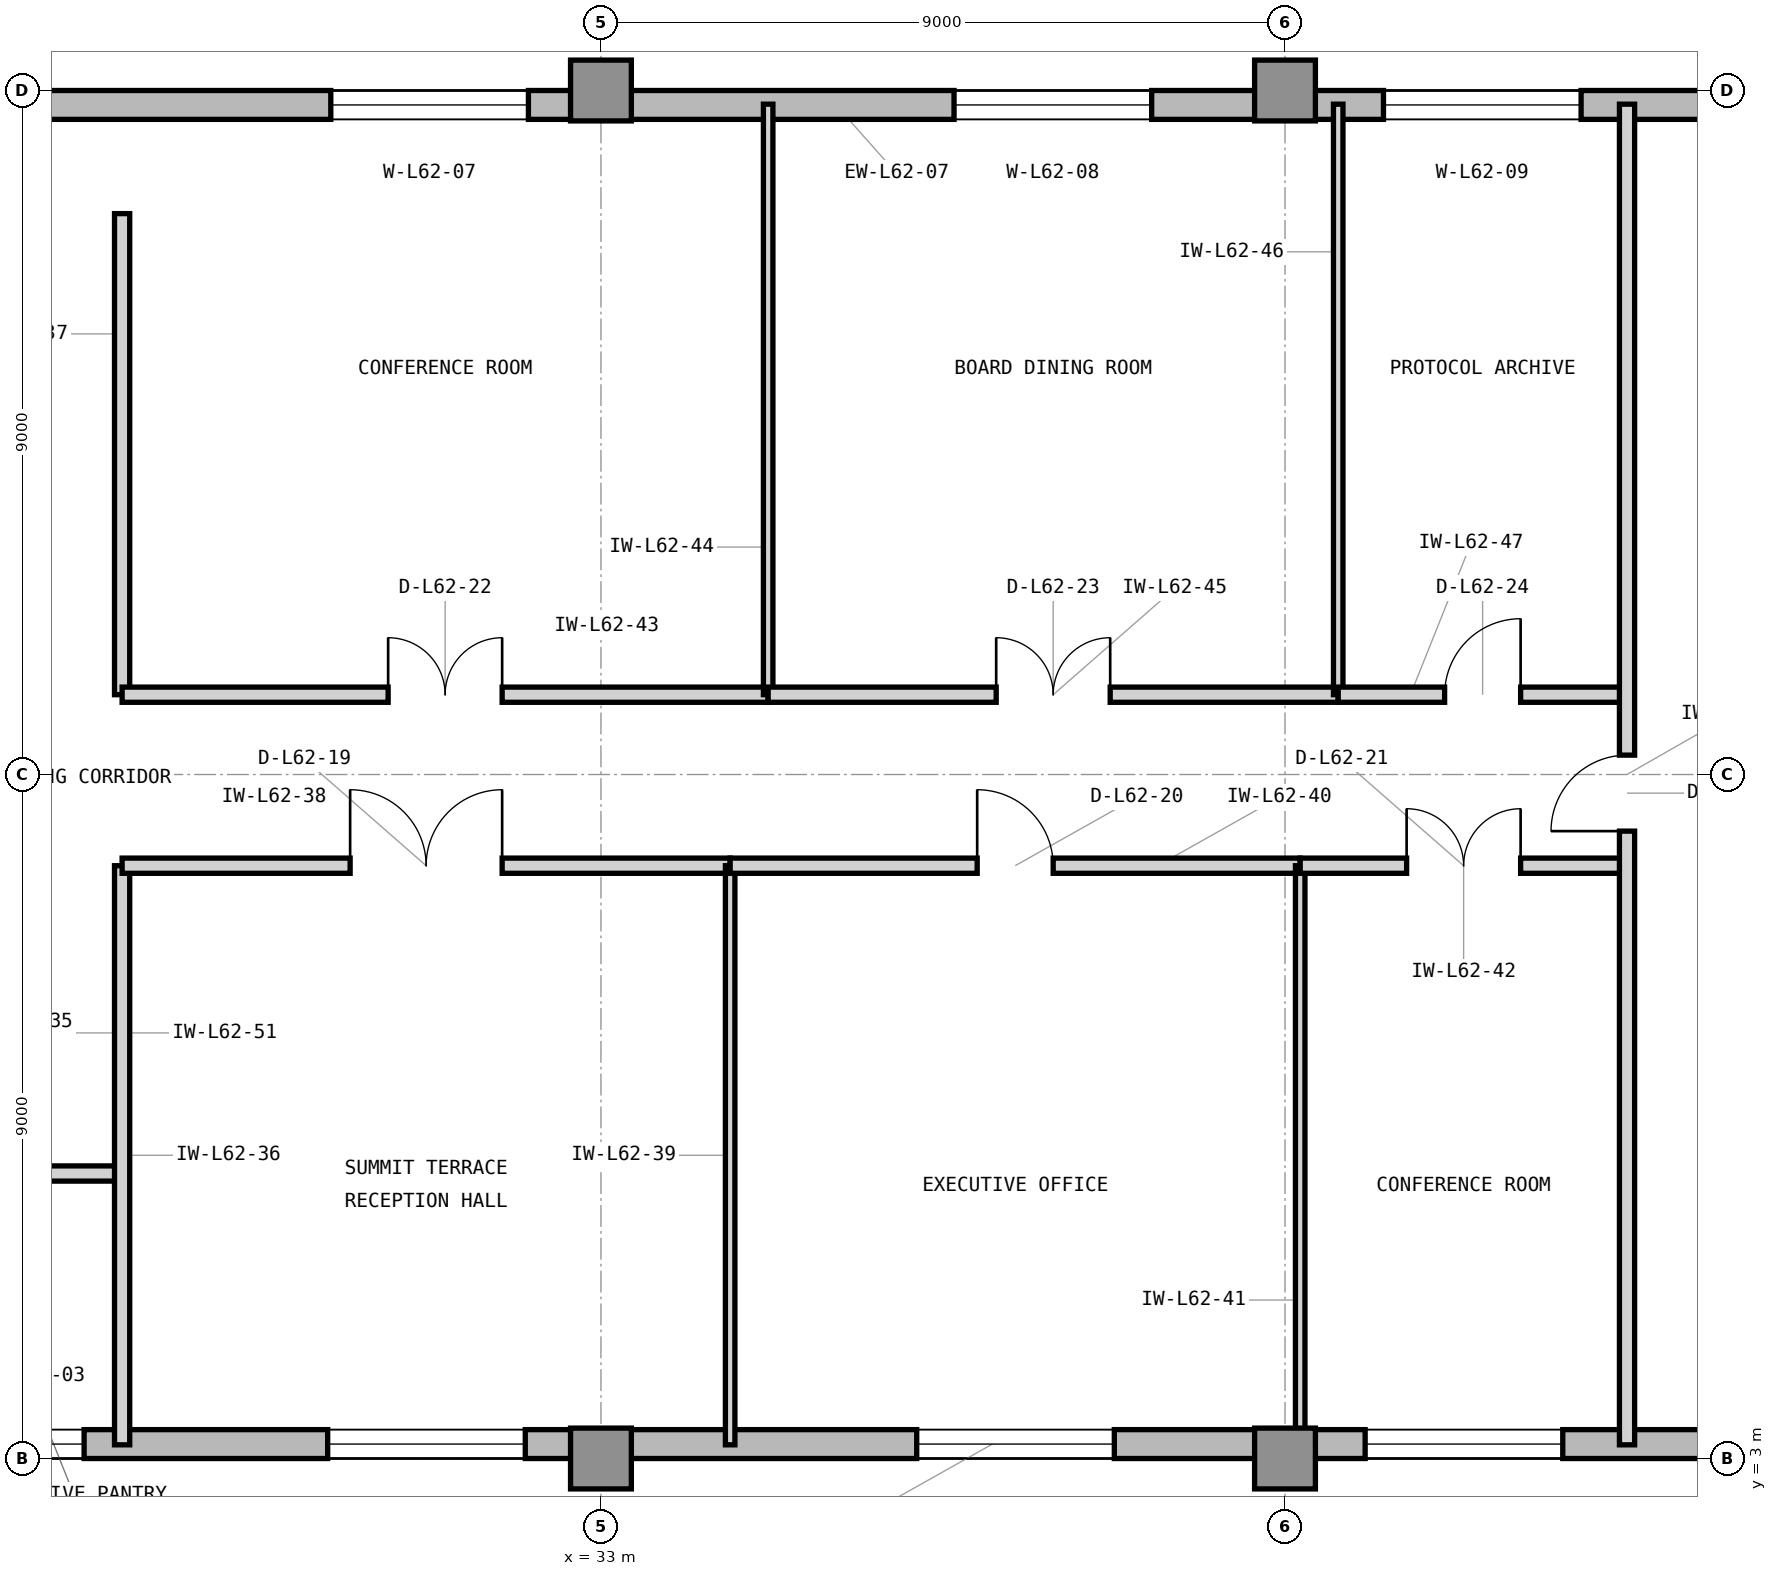
"""IFC4 building model, lengths in metres.
Left out: names, types, materials, properties, quantities, classifications, styles, units other than length and angle.
Written with IfcOpenShell. Run it as: python <this file> out.ifc"""

import sys

from ifc_helpers import new_model, si_unit, direction, frame, frame_2d, origin, origin_2d, place, context, subcontext, project, spatial, rectangle, extrude, element, fill, save


model = new_model("IFC4")
c1 = context("Model", 3, precision=1e-05, world=origin(), true_north=direction((0.0, 1.0)))
c2 = subcontext(c1, "Body", "Model", "MODEL_VIEW")
j1 = project(units=[si_unit("LENGTHUNIT", "METRE"), si_unit("PLANEANGLEUNIT", "RADIAN")], contexts=[c1])
p1 = place(None, origin())
s1 = spatial("IfcSite", under=j1, at=p1, CompositionType="ELEMENT")
p2 = place(p1, origin())
s2 = spatial("IfcBuilding", under=s1, at=p2, CompositionType="ELEMENT")
p3 = place(p2, frame((0.0, 0.0, 254.7)))
s3 = spatial("IfcBuildingStorey", under=s2, at=p3, CompositionType="ELEMENT", Elevation=254.7)
for number, where, z_axis, x_axis in (
    (1, (33.0, 3.0, 0.0), (0.0, 0.0, 1.0), (1.0, 0.0, 0.0)),
    (2, (33.0, 21.0, 0.0), (0.0, 0.0, 1.0), (1.0, 0.0, 0.0)),
    (3, (42.0, 3.0, 0.0), (0.0, 0.0, 1.0), (1.0, 0.0, 0.0)),
    (4, (42.0, 21.0, 0.0), (0.0, 0.0, 1.0), (1.0, 0.0, 0.0)),
):
    element("IfcColumn", number, at=place(p3, frame(where, z_axis=z_axis, x_axis=x_axis)), inside=s3, PredefinedType="COLUMN", context=c2, shape_type="SweptSolid", body=[
        extrude(rectangle(XDim=0.8, YDim=0.8, at=origin_2d()), origin(), (0.0, 0.0, 1.0), 3.9),
    ])
p4 = place(p3, frame((23.9, 3.19, 0.0), z_axis=(0.0, 0.0, 1.0), x_axis=(1.0, 0.0, 0.0)))
e5 = element("IfcWall", 5, at=p4, inside=s3, PredefinedType="STANDARD", context=c2, shape_type="SweptSolid", body=[
    extrude(rectangle(XDim=28.5, YDim=0.38, at=frame_2d((14.25, 0.0))), origin(), (0.0, 0.0, 1.0), 3.715),
])
p5 = place(p4, frame((1.1, 0.0, 0.8)))
e6 = element("IfcOpeningElement", 6, at=p5, cuts=e5, PredefinedType="OPENING", context=c2, shape_type="SweptSolid", body=[
    extrude(rectangle(XDim=1.2, YDim=2.35, at=frame_2d((0.6, 1.175))), frame((0.0, 0.2, 0.0), z_axis=(0.0, -1.0, 0.0), x_axis=(1.0, 0.0, 0.0)), (0.0, 0.0, 1.0), 0.4),
])
p6 = place(p4, frame((5.504, 0.0, 0.8)))
e7 = element("IfcOpeningElement", 7, at=p6, cuts=e5, PredefinedType="OPENING", context=c2, shape_type="SweptSolid", body=[
    extrude(rectangle(XDim=2.6, YDim=2.35, at=frame_2d((1.3, 1.175))), frame((0.0, 0.2, 0.0), z_axis=(0.0, -1.0, 0.0), x_axis=(1.0, 0.0, 0.0)), (0.0, 0.0, 1.0), 0.4),
])
p7 = place(p4, frame((13.254, 0.0, 0.8)))
e8 = element("IfcOpeningElement", 8, at=p7, cuts=e5, PredefinedType="OPENING", context=c2, shape_type="SweptSolid", body=[
    extrude(rectangle(XDim=2.6, YDim=2.35, at=frame_2d((1.3, 1.175))), frame((0.0, 0.2, 0.0), z_axis=(0.0, -1.0, 0.0), x_axis=(1.0, 0.0, 0.0)), (0.0, 0.0, 1.0), 0.4),
])
p8 = place(p4, frame((19.154, 0.0, 0.8)))
e9 = element("IfcOpeningElement", 9, at=p8, cuts=e5, PredefinedType="OPENING", context=c2, shape_type="SweptSolid", body=[
    extrude(rectangle(XDim=2.6, YDim=2.35, at=frame_2d((1.3, 1.175))), frame((0.0, 0.2, 0.0), z_axis=(0.0, -1.0, 0.0), x_axis=(1.0, 0.0, 0.0)), (0.0, 0.0, 1.0), 0.4),
])
p9 = place(p3, frame((52.4, 20.81, 0.0), z_axis=(0.0, 0.0, 1.0), x_axis=(-1.0, 0.0, 0.0)))
e10 = element("IfcWall", 10, at=p9, inside=s3, PredefinedType="STANDARD", context=c2, shape_type="SweptSolid", body=[
    extrude(rectangle(XDim=32.62, YDim=0.38, at=frame_2d((16.31, 0.0))), origin(), (0.0, 0.0, 1.0), 3.715),
])
p10 = place(p9, frame((29.6, 0.0, 0.0)))
e11 = element("IfcOpeningElement", 11, at=p10, cuts=e10, PredefinedType="OPENING", context=c2, shape_type="SweptSolid", body=[
    extrude(rectangle(XDim=1.1, YDim=2.3, at=frame_2d((0.55, 1.15))), frame((0.0, 0.2, 0.0), z_axis=(0.0, -1.0, 0.0), x_axis=(1.0, 0.0, 0.0)), (0.0, 0.0, 1.0), 0.4),
])
p11 = place(p9, frame((20.354, 0.0, 0.8)))
e12 = element("IfcOpeningElement", 12, at=p11, cuts=e10, PredefinedType="OPENING", context=c2, shape_type="SweptSolid", body=[
    extrude(rectangle(XDim=2.6, YDim=2.35, at=frame_2d((1.3, 1.175))), frame((0.0, 0.2, 0.0), z_axis=(0.0, -1.0, 0.0), x_axis=(1.0, 0.0, 0.0)), (0.0, 0.0, 1.0), 0.4),
])
p12 = place(p9, frame((12.154, 0.0, 0.8)))
e13 = element("IfcOpeningElement", 13, at=p12, cuts=e10, PredefinedType="OPENING", context=c2, shape_type="SweptSolid", body=[
    extrude(rectangle(XDim=2.6, YDim=2.35, at=frame_2d((1.3, 1.175))), frame((0.0, 0.2, 0.0), z_axis=(0.0, -1.0, 0.0), x_axis=(1.0, 0.0, 0.0)), (0.0, 0.0, 1.0), 0.4),
])
p13 = place(p9, frame((6.504, 0.0, 0.8)))
e14 = element("IfcOpeningElement", 14, at=p13, cuts=e10, PredefinedType="OPENING", context=c2, shape_type="SweptSolid", body=[
    extrude(rectangle(XDim=2.6, YDim=2.35, at=frame_2d((1.3, 1.175))), frame((0.0, 0.2, 0.0), z_axis=(0.0, -1.0, 0.0), x_axis=(1.0, 0.0, 0.0)), (0.0, 0.0, 1.0), 0.4),
])
p14 = place(p3, frame((23.85, 6.75, 0.0), z_axis=(0.0, 0.0, 1.0), x_axis=(1.0, 0.0, 0.0)))
e15 = element("IfcWall", 15, at=p14, inside=s3, PredefinedType="PARTITIONING", context=c2, shape_type="SweptSolid", body=[
    extrude(rectangle(XDim=2.85, YDim=0.2, at=frame_2d((1.425, 0.0))), origin(), (0.0, 0.0, 1.0), 3.705),
])
p15 = place(p14, frame((0.7, 0.0, 0.0)))
e16 = element("IfcOpeningElement", 16, at=p15, cuts=e15, PredefinedType="OPENING", context=c2, shape_type="SweptSolid", body=[
    extrude(rectangle(XDim=1.0, YDim=2.15, at=frame_2d((0.5, 1.075))), frame((0.0, 0.11, 0.0), z_axis=(0.0, -1.0, 0.0), x_axis=(1.0, 0.0, 0.0)), (0.0, 0.0, 1.0), 0.22),
])
p16 = place(p3, frame((26.7, 3.18, 0.0), z_axis=(0.0, 0.0, 1.0), x_axis=(0.0, 1.0, 0.0)))
e17 = element("IfcWall", 17, at=p16, inside=s3, PredefinedType="PARTITIONING", context=c2, shape_type="SweptSolid", body=[
    extrude(rectangle(XDim=7.62, YDim=0.2, at=frame_2d((3.81, 0.0))), origin(), (0.0, 0.0, 1.0), 3.705),
])
p17 = place(p3, frame((26.7, 13.05, 0.0), z_axis=(0.0, 0.0, 1.0), x_axis=(0.0, 1.0, 0.0)))
e18 = element("IfcWall", 18, at=p17, inside=s3, PredefinedType="PARTITIONING", context=c2, shape_type="SweptSolid", body=[
    extrude(rectangle(XDim=6.33, YDim=0.2, at=frame_2d((3.165, 0.0))), origin(), (0.0, 0.0, 1.0), 3.705),
])
p18 = place(p3, frame((26.7, 10.8, 0.0), z_axis=(0.0, 0.0, 1.0), x_axis=(1.0, 0.0, 0.0)))
e19 = element("IfcWall", 19, at=p18, inside=s3, PredefinedType="PARTITIONING", context=c2, shape_type="SweptSolid", body=[
    extrude(rectangle(XDim=8.0, YDim=0.2, at=frame_2d((4.0, 0.0))), origin(), (0.0, 0.0, 1.0), 3.705),
])
p19 = place(p18, frame((3.0, 0.0, 0.0)))
e20 = element("IfcOpeningElement", 20, at=p19, cuts=e19, PredefinedType="OPENING", context=c2, shape_type="SweptSolid", body=[
    extrude(rectangle(XDim=2.0, YDim=2.5, at=frame_2d((1.0, 1.25))), frame((0.0, 0.11, 0.0), z_axis=(0.0, -1.0, 0.0), x_axis=(1.0, 0.0, 0.0)), (0.0, 0.0, 1.0), 0.22),
])
p20 = place(p3, frame((34.7, 3.18, 0.0), z_axis=(0.0, 0.0, 1.0), x_axis=(0.0, 1.0, 0.0)))
e21 = element("IfcWall", 21, at=p20, inside=s3, PredefinedType="PARTITIONING", context=c2, shape_type="SweptSolid", body=[
    extrude(rectangle(XDim=7.62, YDim=0.125, at=frame_2d((3.81, 0.0))), origin(), (0.0, 0.0, 1.0), 3.705),
])
p21 = place(p3, frame((34.7, 10.8, 0.0), z_axis=(0.0, 0.0, 1.0), x_axis=(1.0, 0.0, 0.0)))
e22 = element("IfcWall", 22, at=p21, inside=s3, PredefinedType="PARTITIONING", context=c2, shape_type="SweptSolid", body=[
    extrude(rectangle(XDim=7.5, YDim=0.2, at=frame_2d((3.75, 0.0))), origin(), (0.0, 0.0, 1.0), 3.705),
])
p22 = place(p21, frame((3.25, 0.0, 0.0)))
e23 = element("IfcOpeningElement", 23, at=p22, cuts=e22, PredefinedType="OPENING", context=c2, shape_type="SweptSolid", body=[
    extrude(rectangle(XDim=1.0, YDim=2.15, at=frame_2d((0.5, 1.075))), frame((0.0, 0.11, 0.0), z_axis=(0.0, -1.0, 0.0), x_axis=(1.0, 0.0, 0.0)), (0.0, 0.0, 1.0), 0.22),
])
p23 = place(p3, frame((42.2, 3.18, 0.0), z_axis=(0.0, 0.0, 1.0), x_axis=(0.0, 1.0, 0.0)))
e24 = element("IfcWall", 24, at=p23, inside=s3, PredefinedType="PARTITIONING", context=c2, shape_type="SweptSolid", body=[
    extrude(rectangle(XDim=7.62, YDim=0.125, at=frame_2d((3.81, 0.0))), origin(), (0.0, 0.0, 1.0), 3.705),
])
p24 = place(p3, frame((42.2, 10.8, 0.0), z_axis=(0.0, 0.0, 1.0), x_axis=(1.0, 0.0, 0.0)))
e25 = element("IfcWall", 25, at=p24, inside=s3, PredefinedType="PARTITIONING", context=c2, shape_type="SweptSolid", body=[
    extrude(rectangle(XDim=4.3, YDim=0.2, at=frame_2d((2.15, 0.0))), origin(), (0.0, 0.0, 1.0), 3.705),
])
p25 = place(p24, frame((1.4, 0.0, 0.0)))
e26 = element("IfcOpeningElement", 26, at=p25, cuts=e25, PredefinedType="OPENING", context=c2, shape_type="SweptSolid", body=[
    extrude(rectangle(XDim=1.5, YDim=2.3, at=frame_2d((0.75, 1.15))), frame((0.0, 0.11, 0.0), z_axis=(0.0, -1.0, 0.0), x_axis=(1.0, 0.0, 0.0)), (0.0, 0.0, 1.0), 0.22),
])
p26 = place(p3, frame((26.7, 13.05, 0.0), z_axis=(0.0, 0.0, 1.0), x_axis=(1.0, 0.0, 0.0)))
e27 = element("IfcWall", 27, at=p26, inside=s3, PredefinedType="PARTITIONING", context=c2, shape_type="SweptSolid", body=[
    extrude(rectangle(XDim=8.5, YDim=0.2, at=frame_2d((4.25, 0.0))), origin(), (0.0, 0.0, 1.0), 3.705),
])
p27 = place(p26, frame((3.5, 0.0, 0.0)))
e28 = element("IfcOpeningElement", 28, at=p27, cuts=e27, PredefinedType="OPENING", context=c2, shape_type="SweptSolid", body=[
    extrude(rectangle(XDim=1.5, YDim=2.3, at=frame_2d((0.75, 1.15))), frame((0.0, 0.11, 0.0), z_axis=(0.0, -1.0, 0.0), x_axis=(1.0, 0.0, 0.0)), (0.0, 0.0, 1.0), 0.22),
])
p28 = place(p3, frame((35.2, 13.05, 0.0), z_axis=(0.0, 0.0, 1.0), x_axis=(0.0, 1.0, 0.0)))
e29 = element("IfcWall", 29, at=p28, inside=s3, PredefinedType="PARTITIONING", context=c2, shape_type="SweptSolid", body=[
    extrude(rectangle(XDim=7.77, YDim=0.125, at=frame_2d((3.885, 0.0))), origin(), (0.0, 0.0, 1.0), 3.705),
])
p29 = place(p3, frame((35.2, 13.05, 0.0), z_axis=(0.0, 0.0, 1.0), x_axis=(1.0, 0.0, 0.0)))
e30 = element("IfcWall", 30, at=p29, inside=s3, PredefinedType="PARTITIONING", context=c2, shape_type="SweptSolid", body=[
    extrude(rectangle(XDim=7.5, YDim=0.2, at=frame_2d((3.75, 0.0))), origin(), (0.0, 0.0, 1.0), 3.705),
])
p30 = place(p29, frame((3.0, 0.0, 0.0)))
e31 = element("IfcOpeningElement", 31, at=p30, cuts=e30, PredefinedType="OPENING", context=c2, shape_type="SweptSolid", body=[
    extrude(rectangle(XDim=1.5, YDim=2.3, at=frame_2d((0.75, 1.15))), frame((0.0, 0.11, 0.0), z_axis=(0.0, -1.0, 0.0), x_axis=(1.0, 0.0, 0.0)), (0.0, 0.0, 1.0), 0.22),
])
p31 = place(p3, frame((42.7, 13.05, 0.0), z_axis=(0.0, 0.0, 1.0), x_axis=(0.0, 1.0, 0.0)))
e32 = element("IfcWall", 32, at=p31, inside=s3, PredefinedType="PARTITIONING", context=c2, shape_type="SweptSolid", body=[
    extrude(rectangle(XDim=7.77, YDim=0.125, at=frame_2d((3.885, 0.0))), origin(), (0.0, 0.0, 1.0), 3.705),
])
p32 = place(p3, frame((42.7, 13.05, 0.0), z_axis=(0.0, 0.0, 1.0), x_axis=(1.0, 0.0, 0.0)))
e33 = element("IfcWall", 33, at=p32, inside=s3, PredefinedType="PARTITIONING", context=c2, shape_type="SweptSolid", body=[
    extrude(rectangle(XDim=3.8, YDim=0.2, at=frame_2d((1.9, 0.0))), origin(), (0.0, 0.0, 1.0), 3.705),
])
p33 = place(p32, frame((1.4, 0.0, 0.0)))
e34 = element("IfcOpeningElement", 34, at=p33, cuts=e33, PredefinedType="OPENING", context=c2, shape_type="SweptSolid", body=[
    extrude(rectangle(XDim=1.0, YDim=2.15, at=frame_2d((0.5, 1.075))), frame((0.0, 0.11, 0.0), z_axis=(0.0, -1.0, 0.0), x_axis=(1.0, 0.0, 0.0)), (0.0, 0.0, 1.0), 0.22),
])
p34 = place(p3, frame((46.5, 3.18, 0.0), z_axis=(0.0, 0.0, 1.0), x_axis=(0.0, 1.0, 0.0)))
e35 = element("IfcWall", 35, at=p34, inside=s3, PredefinedType="PARTITIONING", context=c2, shape_type="SweptSolid", body=[
    extrude(rectangle(XDim=17.64, YDim=0.2, at=frame_2d((8.82, 0.0))), origin(), (0.0, 0.0, 1.0), 3.705),
])
p35 = place(p34, frame((8.075, 0.0, 0.0)))
e36 = element("IfcOpeningElement", 36, at=p35, cuts=e35, PredefinedType="OPENING", context=c2, shape_type="SweptSolid", body=[
    extrude(rectangle(XDim=1.0, YDim=2.15, at=frame_2d((0.5, 1.075))), frame((0.0, 0.11, 0.0), z_axis=(0.0, -1.0, 0.0), x_axis=(1.0, 0.0, 0.0)), (0.0, 0.0, 1.0), 0.22),
])
p36 = place(p19, origin())
e37 = element("IfcDoor", 37, at=p36, inside=s3, OperationType="DOUBLE_DOOR_SINGLE_SWING", PredefinedType="DOOR", context=c2, shape_type="SweptSolid", body=[
    extrude(rectangle(XDim=2.0, YDim=2.5, at=frame_2d((1.0, 1.25))), frame((0.0, 0.025, 0.0), z_axis=(0.0, -1.0, 0.0), x_axis=(1.0, 0.0, 0.0)), (0.0, 0.0, 1.0), 0.05),
])
fill(e20, e37)
p37 = place(p22, origin())
e38 = element("IfcDoor", 38, at=p37, inside=s3, OperationType="SINGLE_SWING_LEFT", PredefinedType="DOOR", context=c2, shape_type="SweptSolid", body=[
    extrude(rectangle(XDim=1.0, YDim=2.15, at=frame_2d((0.5, 1.075))), frame((0.0, 0.025, 0.0), z_axis=(0.0, -1.0, 0.0), x_axis=(1.0, 0.0, 0.0)), (0.0, 0.0, 1.0), 0.05),
])
fill(e23, e38)
p38 = place(p25, origin())
e39 = element("IfcDoor", 39, at=p38, inside=s3, OperationType="DOUBLE_DOOR_SINGLE_SWING", PredefinedType="DOOR", context=c2, shape_type="SweptSolid", body=[
    extrude(rectangle(XDim=1.5, YDim=2.3, at=frame_2d((0.75, 1.15))), frame((0.0, 0.025, 0.0), z_axis=(0.0, -1.0, 0.0), x_axis=(1.0, 0.0, 0.0)), (0.0, 0.0, 1.0), 0.05),
])
fill(e26, e39)
p39 = place(p27, origin())
e40 = element("IfcDoor", 40, at=p39, inside=s3, OperationType="DOUBLE_DOOR_SINGLE_SWING", PredefinedType="DOOR", context=c2, shape_type="SweptSolid", body=[
    extrude(rectangle(XDim=1.5, YDim=2.3, at=frame_2d((0.75, 1.15))), frame((0.0, 0.025, 0.0), z_axis=(0.0, -1.0, 0.0), x_axis=(1.0, 0.0, 0.0)), (0.0, 0.0, 1.0), 0.05),
])
fill(e28, e40)
p40 = place(p30, origin())
e41 = element("IfcDoor", 41, at=p40, inside=s3, OperationType="DOUBLE_DOOR_SINGLE_SWING", PredefinedType="DOOR", context=c2, shape_type="SweptSolid", body=[
    extrude(rectangle(XDim=1.5, YDim=2.3, at=frame_2d((0.75, 1.15))), frame((0.0, 0.025, 0.0), z_axis=(0.0, -1.0, 0.0), x_axis=(1.0, 0.0, 0.0)), (0.0, 0.0, 1.0), 0.05),
])
fill(e31, e41)
p41 = place(p33, origin())
e42 = element("IfcDoor", 42, at=p41, inside=s3, OperationType="SINGLE_SWING_RIGHT", PredefinedType="DOOR", context=c2, shape_type="SweptSolid", body=[
    extrude(rectangle(XDim=1.0, YDim=2.15, at=frame_2d((0.5, 1.075))), frame((0.0, 0.025, 0.0), z_axis=(0.0, -1.0, 0.0), x_axis=(1.0, 0.0, 0.0)), (0.0, 0.0, 1.0), 0.05),
])
fill(e34, e42)
p42 = place(p35, origin())
e43 = element("IfcDoor", 43, at=p42, inside=s3, OperationType="SINGLE_SWING_LEFT", PredefinedType="DOOR", context=c2, shape_type="SweptSolid", body=[
    extrude(rectangle(XDim=1.0, YDim=2.15, at=frame_2d((0.5, 1.075))), frame((0.0, 0.025, 0.0), z_axis=(0.0, -1.0, 0.0), x_axis=(1.0, 0.0, 0.0)), (0.0, 0.0, 1.0), 0.05),
])
fill(e36, e43)
p43 = place(p5, origin())
e44 = element("IfcWindow", 44, at=p43, inside=s3, PartitioningType="SINGLE_PANEL", PredefinedType="WINDOW", context=c2, shape_type="SweptSolid", body=[
    extrude(rectangle(XDim=1.2, YDim=2.35, at=frame_2d((0.6, 1.175))), frame((0.0, 0.11, 0.0), z_axis=(0.0, -1.0, 0.0), x_axis=(1.0, 0.0, 0.0)), (0.0, 0.0, 1.0), 0.06),
])
fill(e6, e44)
p44 = place(p6, origin())
e45 = element("IfcWindow", 45, at=p44, inside=s3, PartitioningType="SINGLE_PANEL", PredefinedType="WINDOW", context=c2, shape_type="SweptSolid", body=[
    extrude(rectangle(XDim=2.6, YDim=2.35, at=frame_2d((1.3, 1.175))), frame((0.0, 0.11, 0.0), z_axis=(0.0, -1.0, 0.0), x_axis=(1.0, 0.0, 0.0)), (0.0, 0.0, 1.0), 0.06),
])
fill(e7, e45)
p45 = place(p7, origin())
e46 = element("IfcWindow", 46, at=p45, inside=s3, PartitioningType="SINGLE_PANEL", PredefinedType="WINDOW", context=c2, shape_type="SweptSolid", body=[
    extrude(rectangle(XDim=2.6, YDim=2.35, at=frame_2d((1.3, 1.175))), frame((0.0, 0.11, 0.0), z_axis=(0.0, -1.0, 0.0), x_axis=(1.0, 0.0, 0.0)), (0.0, 0.0, 1.0), 0.06),
])
fill(e8, e46)
p46 = place(p8, origin())
e47 = element("IfcWindow", 47, at=p46, inside=s3, PartitioningType="SINGLE_PANEL", PredefinedType="WINDOW", context=c2, shape_type="SweptSolid", body=[
    extrude(rectangle(XDim=2.6, YDim=2.35, at=frame_2d((1.3, 1.175))), frame((0.0, 0.11, 0.0), z_axis=(0.0, -1.0, 0.0), x_axis=(1.0, 0.0, 0.0)), (0.0, 0.0, 1.0), 0.06),
])
fill(e9, e47)
p47 = place(p11, origin())
e48 = element("IfcWindow", 48, at=p47, inside=s3, PartitioningType="SINGLE_PANEL", PredefinedType="WINDOW", context=c2, shape_type="SweptSolid", body=[
    extrude(rectangle(XDim=2.6, YDim=2.35, at=frame_2d((1.3, 1.175))), frame((0.0, 0.11, 0.0), z_axis=(0.0, -1.0, 0.0), x_axis=(1.0, 0.0, 0.0)), (0.0, 0.0, 1.0), 0.06),
])
fill(e12, e48)
p48 = place(p12, origin())
e49 = element("IfcWindow", 49, at=p48, inside=s3, PartitioningType="SINGLE_PANEL", PredefinedType="WINDOW", context=c2, shape_type="SweptSolid", body=[
    extrude(rectangle(XDim=2.6, YDim=2.35, at=frame_2d((1.3, 1.175))), frame((0.0, 0.11, 0.0), z_axis=(0.0, -1.0, 0.0), x_axis=(1.0, 0.0, 0.0)), (0.0, 0.0, 1.0), 0.06),
])
fill(e13, e49)
p49 = place(p13, origin())
e50 = element("IfcWindow", 50, at=p49, inside=s3, PartitioningType="SINGLE_PANEL", PredefinedType="WINDOW", context=c2, shape_type="SweptSolid", body=[
    extrude(rectangle(XDim=2.6, YDim=2.35, at=frame_2d((1.3, 1.175))), frame((0.0, 0.11, 0.0), z_axis=(0.0, -1.0, 0.0), x_axis=(1.0, 0.0, 0.0)), (0.0, 0.0, 1.0), 0.06),
])
fill(e14, e50)
save(model, sys.argv[1])
